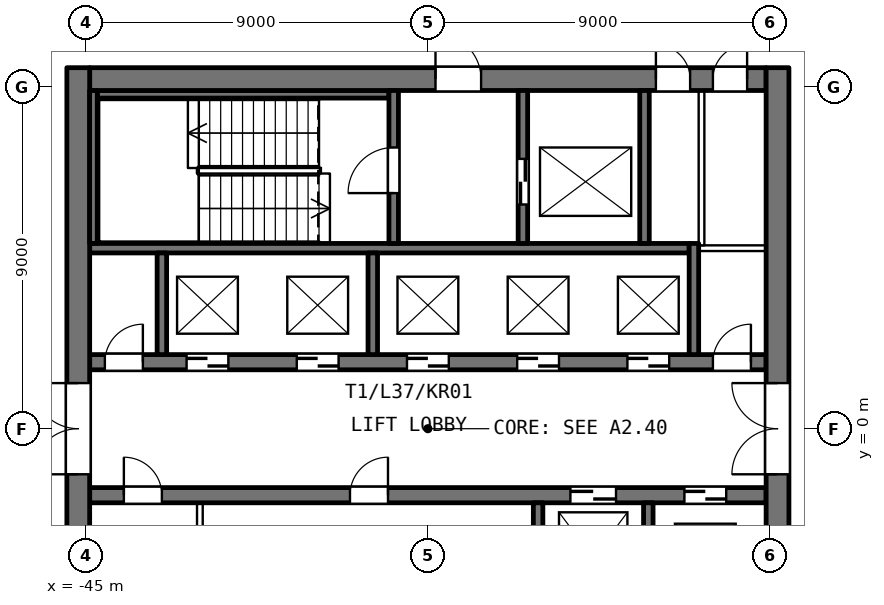
"""IFC4 building model, lengths in metres.
Left out: names, types, materials, properties, quantities, classifications, styles, units other than length and angle.
Written with IfcOpenShell. Run it as: python <this file> out.ifc"""

import sys

from ifc_helpers import new_model, si_unit, direction, frame, frame_2d, origin, place, context, subcontext, project, spatial, rectangle, extrude, element, fill, save


model = new_model("IFC4")
c1 = context("Model", 3, precision=1e-05, world=origin(), true_north=direction((0.0, 1.0)))
c2 = subcontext(c1, "Body", "Model", "MODEL_VIEW")
j1 = project(units=[si_unit("LENGTHUNIT", "METRE"), si_unit("PLANEANGLEUNIT", "RADIAN")], contexts=[c1])
p1 = place(None, origin())
s1 = spatial("IfcSite", under=j1, at=p1, CompositionType="ELEMENT")
p2 = place(p1, origin())
s2 = spatial("IfcBuilding", under=s1, at=p2, CompositionType="ELEMENT")
p3 = place(p2, frame((0.0, 0.0, 156.8)))
s3 = spatial("IfcBuildingStorey", under=s2, at=p3, CompositionType="ELEMENT", Elevation=156.8)
p4 = place(p3, frame((-44.9, -1.75, 0.0), z_axis=(0.0, 0.0, 1.0), x_axis=(1.0, 0.0, 0.0)))
e1 = element("IfcWall", 1, at=p4, inside=s3, PredefinedType="SHEAR", context=c2, shape_type="SweptSolid", body=[
    extrude(rectangle(XDim=17.8, YDim=0.4, at=frame_2d((8.9, 0.0))), origin(), (0.0, 0.0, 1.0), 3.7),
])
p5 = place(p4, frame((12.65, 0.0, 0.0)))
e2 = element("IfcOpeningElement", 2, at=p5, cuts=e1, PredefinedType="OPENING", context=c2, shape_type="SweptSolid", body=[
    extrude(rectangle(XDim=1.2, YDim=2.1, at=frame_2d((0.6, 1.05))), frame((0.0, 0.21, 0.0), z_axis=(0.0, -1.0, 0.0), x_axis=(1.0, 0.0, 0.0)), (0.0, 0.0, 1.0), 0.42),
])
p6 = place(p4, frame((15.65, 0.0, 0.0)))
e3 = element("IfcOpeningElement", 3, at=p6, cuts=e1, PredefinedType="OPENING", context=c2, shape_type="SweptSolid", body=[
    extrude(rectangle(XDim=1.1, YDim=2.1, at=frame_2d((0.55, 1.05))), frame((0.0, 0.21, 0.0), z_axis=(0.0, -1.0, 0.0), x_axis=(1.0, 0.0, 0.0)), (0.0, 0.0, 1.0), 0.42),
])
p7 = place(p4, frame((0.9, 0.0, 0.0)))
e4 = element("IfcOpeningElement", 4, at=p7, cuts=e1, PredefinedType="OPENING", context=c2, shape_type="SweptSolid", body=[
    extrude(rectangle(XDim=1.0, YDim=2.1, at=frame_2d((0.5, 1.05))), frame((0.0, 0.21, 0.0), z_axis=(0.0, -1.0, 0.0), x_axis=(1.0, 0.0, 0.0)), (0.0, 0.0, 1.0), 0.42),
])
p8 = place(p4, frame((6.85, 0.0, 0.0)))
e5 = element("IfcOpeningElement", 5, at=p8, cuts=e1, PredefinedType="OPENING", context=c2, shape_type="SweptSolid", body=[
    extrude(rectangle(XDim=1.0, YDim=2.1, at=frame_2d((0.5, 1.05))), frame((0.0, 0.21, 0.0), z_axis=(0.0, -1.0, 0.0), x_axis=(1.0, 0.0, 0.0)), (0.0, 0.0, 1.0), 0.42),
])
p9 = place(p3, frame((-44.9, 1.75, 0.0), z_axis=(0.0, 0.0, 1.0), x_axis=(1.0, 0.0, 0.0)))
e6 = element("IfcWall", 6, at=p9, inside=s3, PredefinedType="SHEAR", context=c2, shape_type="SweptSolid", body=[
    extrude(rectangle(XDim=17.8, YDim=0.4, at=frame_2d((8.9, 0.0))), origin(), (0.0, 0.0, 1.0), 3.7),
])
p10 = place(p9, frame((0.4, 0.0, 0.0)))
e7 = element("IfcOpeningElement", 7, at=p10, cuts=e6, PredefinedType="OPENING", context=c2, shape_type="SweptSolid", body=[
    extrude(rectangle(XDim=1.0, YDim=2.1, at=frame_2d((0.5, 1.05))), frame((0.0, 0.21, 0.0), z_axis=(0.0, -1.0, 0.0), x_axis=(1.0, 0.0, 0.0)), (0.0, 0.0, 1.0), 0.42),
])
p11 = place(p9, frame((2.55, 0.0, 0.0)))
e8 = element("IfcOpeningElement", 8, at=p11, cuts=e6, PredefinedType="OPENING", context=c2, shape_type="SweptSolid", body=[
    extrude(rectangle(XDim=1.1, YDim=2.1, at=frame_2d((0.55, 1.05))), frame((0.0, 0.21, 0.0), z_axis=(0.0, -1.0, 0.0), x_axis=(1.0, 0.0, 0.0)), (0.0, 0.0, 1.0), 0.42),
])
p12 = place(p9, frame((5.45, 0.0, 0.0)))
e9 = element("IfcOpeningElement", 9, at=p12, cuts=e6, PredefinedType="OPENING", context=c2, shape_type="SweptSolid", body=[
    extrude(rectangle(XDim=1.1, YDim=2.1, at=frame_2d((0.55, 1.05))), frame((0.0, 0.21, 0.0), z_axis=(0.0, -1.0, 0.0), x_axis=(1.0, 0.0, 0.0)), (0.0, 0.0, 1.0), 0.42),
])
p13 = place(p9, frame((8.35, 0.0, 0.0)))
e10 = element("IfcOpeningElement", 10, at=p13, cuts=e6, PredefinedType="OPENING", context=c2, shape_type="SweptSolid", body=[
    extrude(rectangle(XDim=1.1, YDim=2.1, at=frame_2d((0.55, 1.05))), frame((0.0, 0.21, 0.0), z_axis=(0.0, -1.0, 0.0), x_axis=(1.0, 0.0, 0.0)), (0.0, 0.0, 1.0), 0.42),
])
p14 = place(p9, frame((11.25, 0.0, 0.0)))
e11 = element("IfcOpeningElement", 11, at=p14, cuts=e6, PredefinedType="OPENING", context=c2, shape_type="SweptSolid", body=[
    extrude(rectangle(XDim=1.1, YDim=2.1, at=frame_2d((0.55, 1.05))), frame((0.0, 0.21, 0.0), z_axis=(0.0, -1.0, 0.0), x_axis=(1.0, 0.0, 0.0)), (0.0, 0.0, 1.0), 0.42),
])
p15 = place(p9, frame((14.15, 0.0, 0.0)))
e12 = element("IfcOpeningElement", 12, at=p15, cuts=e6, PredefinedType="OPENING", context=c2, shape_type="SweptSolid", body=[
    extrude(rectangle(XDim=1.1, YDim=2.1, at=frame_2d((0.55, 1.05))), frame((0.0, 0.21, 0.0), z_axis=(0.0, -1.0, 0.0), x_axis=(1.0, 0.0, 0.0)), (0.0, 0.0, 1.0), 0.42),
])
p16 = place(p9, frame((16.4, 0.0, 0.0)))
e13 = element("IfcOpeningElement", 13, at=p16, cuts=e6, PredefinedType="OPENING", context=c2, shape_type="SweptSolid", body=[
    extrude(rectangle(XDim=1.0, YDim=2.1, at=frame_2d((0.5, 1.05))), frame((0.0, 0.21, 0.0), z_axis=(0.0, -1.0, 0.0), x_axis=(1.0, 0.0, 0.0)), (0.0, 0.0, 1.0), 0.42),
])
p17 = place(p3, frame((-44.9, 4.75, 0.0), z_axis=(0.0, 0.0, 1.0), x_axis=(1.0, 0.0, 0.0)))
e14 = element("IfcWall", 14, at=p17, inside=s3, PredefinedType="SHEAR", context=c2, shape_type="SweptSolid", body=[
    extrude(rectangle(XDim=15.775, YDim=0.25, at=frame_2d((7.887, 0.0))), origin(), (0.0, 0.0, 1.0), 3.7),
])
p18 = place(p3, frame((-28.875, 4.75, 0.0), z_axis=(0.0, 0.0, 1.0), x_axis=(1.0, 0.0, 0.0)))
e15 = element("IfcWall", 15, at=p18, inside=s3, PredefinedType="PARTITIONING", context=c2, shape_type="SweptSolid", body=[
    extrude(rectangle(XDim=1.775, YDim=0.15, at=frame_2d((0.887, 0.0))), origin(), (0.0, 0.0, 1.0), 3.7),
])
p19 = place(p3, frame((-44.7, 8.8, 0.0), z_axis=(0.0, 0.0, 1.0), x_axis=(1.0, 0.0, 0.0)))
e16 = element("IfcWall", 16, at=p19, inside=s3, PredefinedType="SHEAR", context=c2, shape_type="SweptSolid", body=[
    extrude(rectangle(XDim=7.675, YDim=0.2, at=frame_2d((3.837, 0.0))), origin(), (0.0, 0.0, 1.0), 3.7),
])
p20 = place(p3, frame((-44.9, 9.2, 0.0), z_axis=(0.0, 0.0, 1.0), x_axis=(1.0, 0.0, 0.0)))
e17 = element("IfcWall", 17, at=p20, inside=s3, PredefinedType="SHEAR", context=c2, shape_type="SweptSolid", body=[
    extrude(rectangle(XDim=17.8, YDim=0.6, at=frame_2d((8.9, 0.0))), origin(), (0.0, 0.0, 1.0), 3.7),
])
p21 = place(p20, frame((9.1, 0.0, 0.0)))
e18 = element("IfcOpeningElement", 18, at=p21, cuts=e17, PredefinedType="OPENING", context=c2, shape_type="SweptSolid", body=[
    extrude(rectangle(XDim=1.2, YDim=2.1, at=frame_2d((0.6, 1.05))), frame((0.0, 0.31, 0.0), z_axis=(0.0, -1.0, 0.0), x_axis=(1.0, 0.0, 0.0)), (0.0, 0.0, 1.0), 0.62),
])
p22 = place(p20, frame((14.9, 0.0, 0.0)))
e19 = element("IfcOpeningElement", 19, at=p22, cuts=e17, PredefinedType="OPENING", context=c2, shape_type="SweptSolid", body=[
    extrude(rectangle(XDim=0.9, YDim=2.1, at=frame_2d((0.45, 1.05))), frame((0.0, 0.31, 0.0), z_axis=(0.0, -1.0, 0.0), x_axis=(1.0, 0.0, 0.0)), (0.0, 0.0, 1.0), 0.62),
])
p23 = place(p20, frame((16.4, 0.0, 0.0)))
e20 = element("IfcOpeningElement", 20, at=p23, cuts=e17, PredefinedType="OPENING", context=c2, shape_type="SweptSolid", body=[
    extrude(rectangle(XDim=0.9, YDim=2.1, at=frame_2d((0.45, 1.05))), frame((0.0, 0.31, 0.0), z_axis=(0.0, -1.0, 0.0), x_axis=(1.0, 0.0, 0.0)), (0.0, 0.0, 1.0), 0.62),
])
p24 = place(p3, frame((-45.2, -9.5, 0.0), z_axis=(0.0, 0.0, 1.0), x_axis=(0.0, 1.0, 0.0)))
e21 = element("IfcWall", 21, at=p24, inside=s3, PredefinedType="SHEAR", context=c2, shape_type="SweptSolid", body=[
    extrude(rectangle(XDim=19.0, YDim=0.6, at=frame_2d((9.5, 0.0))), origin(), (0.0, 0.0, 1.0), 3.7),
])
p25 = place(p24, frame((8.3, 0.0, 0.0)))
e22 = element("IfcOpeningElement", 22, at=p25, cuts=e21, PredefinedType="OPENING", context=c2, shape_type="SweptSolid", body=[
    extrude(rectangle(XDim=2.4, YDim=2.1, at=frame_2d((1.2, 1.05))), frame((0.0, 0.31, 0.0), z_axis=(0.0, -1.0, 0.0), x_axis=(1.0, 0.0, 0.0)), (0.0, 0.0, 1.0), 0.62),
])
p26 = place(p3, frame((-44.8, 4.875, 0.0), z_axis=(0.0, 0.0, 1.0), x_axis=(0.0, 1.0, 0.0)))
e23 = element("IfcWall", 23, at=p26, inside=s3, PredefinedType="SHEAR", context=c2, shape_type="SweptSolid", body=[
    extrude(rectangle(XDim=4.025, YDim=0.2, at=frame_2d((2.012, 0.0))), origin(), (0.0, 0.0, 1.0), 3.7),
])
p27 = place(p3, frame((-43.0, 1.95, 0.0), z_axis=(0.0, 0.0, 1.0), x_axis=(0.0, 1.0, 0.0)))
e24 = element("IfcWall", 24, at=p27, inside=s3, PredefinedType="SHEAR", context=c2, shape_type="SweptSolid", body=[
    extrude(rectangle(XDim=2.675, YDim=0.25, at=frame_2d((1.337, 0.0))), origin(), (0.0, 0.0, 1.0), 3.7),
])
p28 = place(p3, frame((-42.0, -4.675, 0.0), z_axis=(0.0, 0.0, 1.0), x_axis=(0.0, 1.0, 0.0)))
e25 = element("IfcWall", 25, at=p28, inside=s3, PredefinedType="PARTITIONING", context=c2, shape_type="SweptSolid", body=[
    extrude(rectangle(XDim=2.725, YDim=0.15, at=frame_2d((1.363, 0.0))), origin(), (0.0, 0.0, 1.0), 3.7),
])
p29 = place(p3, frame((-37.45, 1.95, 0.0), z_axis=(0.0, 0.0, 1.0), x_axis=(0.0, 1.0, 0.0)))
e26 = element("IfcWall", 26, at=p29, inside=s3, PredefinedType="SHEAR", context=c2, shape_type="SweptSolid", body=[
    extrude(rectangle(XDim=2.675, YDim=0.25, at=frame_2d((1.337, 0.0))), origin(), (0.0, 0.0, 1.0), 3.7),
])
p30 = place(p3, frame((-36.9, 4.875, 0.0), z_axis=(0.0, 0.0, 1.0), x_axis=(0.0, 1.0, 0.0)))
e27 = element("IfcWall", 27, at=p30, inside=s3, PredefinedType="SHEAR", context=c2, shape_type="SweptSolid", body=[
    extrude(rectangle(XDim=4.025, YDim=0.25, at=frame_2d((2.012, 0.0))), origin(), (0.0, 0.0, 1.0), 3.7),
])
p31 = place(p30, frame((1.325, 0.0, 0.0)))
e28 = element("IfcOpeningElement", 28, at=p31, cuts=e27, PredefinedType="OPENING", context=c2, shape_type="SweptSolid", body=[
    extrude(rectangle(XDim=1.2, YDim=2.1, at=frame_2d((0.6, 1.05))), frame((0.0, 0.135, 0.0), z_axis=(0.0, -1.0, 0.0), x_axis=(1.0, 0.0, 0.0)), (0.0, 0.0, 1.0), 0.27),
])
p32 = place(p3, frame((-33.5, 4.875, 0.0), z_axis=(0.0, 0.0, 1.0), x_axis=(0.0, 1.0, 0.0)))
e29 = element("IfcWall", 29, at=p32, inside=s3, PredefinedType="SHEAR", context=c2, shape_type="SweptSolid", body=[
    extrude(rectangle(XDim=4.025, YDim=0.25, at=frame_2d((2.012, 0.0))), origin(), (0.0, 0.0, 1.0), 3.7),
])
p33 = place(p32, frame((1.025, 0.0, 0.0)))
e30 = element("IfcOpeningElement", 30, at=p33, cuts=e29, PredefinedType="OPENING", context=c2, shape_type="SweptSolid", body=[
    extrude(rectangle(XDim=1.2, YDim=2.1, at=frame_2d((0.6, 1.05))), frame((0.0, 0.135, 0.0), z_axis=(0.0, -1.0, 0.0), x_axis=(1.0, 0.0, 0.0)), (0.0, 0.0, 1.0), 0.27),
])
p34 = place(p3, frame((-33.1, -4.625, 0.0), z_axis=(0.0, 0.0, 1.0), x_axis=(0.0, 1.0, 0.0)))
e31 = element("IfcWall", 31, at=p34, inside=s3, PredefinedType="SHEAR", context=c2, shape_type="SweptSolid", body=[
    extrude(rectangle(XDim=2.675, YDim=0.25, at=frame_2d((1.337, 0.0))), origin(), (0.0, 0.0, 1.0), 3.7),
])
p35 = place(p3, frame((-30.3, 4.875, 0.0), z_axis=(0.0, 0.0, 1.0), x_axis=(0.0, 1.0, 0.0)))
e32 = element("IfcWall", 32, at=p35, inside=s3, PredefinedType="SHEAR", context=c2, shape_type="SweptSolid", body=[
    extrude(rectangle(XDim=4.025, YDim=0.25, at=frame_2d((2.012, 0.0))), origin(), (0.0, 0.0, 1.0), 3.7),
])
p36 = place(p3, frame((-30.2, -4.625, 0.0), z_axis=(0.0, 0.0, 1.0), x_axis=(0.0, 1.0, 0.0)))
e33 = element("IfcWall", 33, at=p36, inside=s3, PredefinedType="SHEAR", context=c2, shape_type="SweptSolid", body=[
    extrude(rectangle(XDim=2.675, YDim=0.25, at=frame_2d((1.337, 0.0))), origin(), (0.0, 0.0, 1.0), 3.7),
])
p37 = place(p3, frame((-29.0, 1.95, 0.0), z_axis=(0.0, 0.0, 1.0), x_axis=(0.0, 1.0, 0.0)))
e34 = element("IfcWall", 34, at=p37, inside=s3, PredefinedType="SHEAR", context=c2, shape_type="SweptSolid", body=[
    extrude(rectangle(XDim=2.925, YDim=0.25, at=frame_2d((1.462, 0.0))), origin(), (0.0, 0.0, 1.0), 3.7),
])
p38 = place(p3, frame((-28.8, 4.825, 0.0), z_axis=(0.0, 0.0, 1.0), x_axis=(0.0, 1.0, 0.0)))
e35 = element("IfcWall", 35, at=p38, inside=s3, PredefinedType="PARTITIONING", context=c2, shape_type="SweptSolid", body=[
    extrude(rectangle(XDim=4.075, YDim=0.15, at=frame_2d((2.038, 0.0))), origin(), (0.0, 0.0, 1.0), 3.7),
])
p39 = place(p3, frame((-26.8, -9.5, 0.0), z_axis=(0.0, 0.0, 1.0), x_axis=(0.0, 1.0, 0.0)))
e36 = element("IfcWall", 36, at=p39, inside=s3, PredefinedType="SHEAR", context=c2, shape_type="SweptSolid", body=[
    extrude(rectangle(XDim=19.0, YDim=0.6, at=frame_2d((9.5, 0.0))), origin(), (0.0, 0.0, 1.0), 3.7),
])
p40 = place(p39, frame((8.3, 0.0, 0.0)))
e37 = element("IfcOpeningElement", 37, at=p40, cuts=e36, PredefinedType="OPENING", context=c2, shape_type="SweptSolid", body=[
    extrude(rectangle(XDim=2.4, YDim=2.1, at=frame_2d((1.2, 1.05))), frame((0.0, 0.31, 0.0), z_axis=(0.0, -1.0, 0.0), x_axis=(1.0, 0.0, 0.0)), (0.0, 0.0, 1.0), 0.62),
])
p41 = place(p25, origin())
e38 = element("IfcDoor", 38, at=p41, inside=s3, OperationType="DOUBLE_DOOR_SINGLE_SWING", PredefinedType="DOOR", context=c2, shape_type="SweptSolid", body=[
    extrude(rectangle(XDim=2.4, YDim=2.1, at=frame_2d((1.2, 1.05))), frame((0.0, -0.125, 0.0), z_axis=(0.0, -1.0, 0.0), x_axis=(1.0, 0.0, 0.0)), (0.0, 0.0, 1.0), 0.05),
])
fill(e22, e38)
p42 = place(p40, origin())
e39 = element("IfcDoor", 39, at=p42, inside=s3, OperationType="DOUBLE_DOOR_SINGLE_SWING", PredefinedType="DOOR", context=c2, shape_type="SweptSolid", body=[
    extrude(rectangle(XDim=2.4, YDim=2.1, at=frame_2d((1.2, 1.05))), frame((0.0, 0.175, 0.0), z_axis=(0.0, -1.0, 0.0), x_axis=(1.0, 0.0, 0.0)), (0.0, 0.0, 1.0), 0.05),
])
fill(e37, e39)
p43 = place(p10, origin())
e40 = element("IfcDoor", 40, at=p43, inside=s3, OperationType="SINGLE_SWING_RIGHT", PredefinedType="DOOR", context=c2, shape_type="SweptSolid", body=[
    extrude(rectangle(XDim=1.0, YDim=2.1, at=frame_2d((0.5, 1.05))), frame((0.0, 0.025, 0.0), z_axis=(0.0, -1.0, 0.0), x_axis=(1.0, 0.0, 0.0)), (0.0, 0.0, 1.0), 0.05),
])
fill(e7, e40)
p44 = place(p11, origin())
e41 = element("IfcDoor", 41, at=p44, inside=s3, OperationType="SLIDING_TO_LEFT", PredefinedType="DOOR", context=c2, shape_type="SweptSolid", body=[
    extrude(rectangle(XDim=1.1, YDim=2.1, at=frame_2d((0.55, 1.05))), frame((0.0, 0.025, 0.0), z_axis=(0.0, -1.0, 0.0), x_axis=(1.0, 0.0, 0.0)), (0.0, 0.0, 1.0), 0.05),
])
fill(e8, e41)
p45 = place(p12, origin())
e42 = element("IfcDoor", 42, at=p45, inside=s3, OperationType="SLIDING_TO_LEFT", PredefinedType="DOOR", context=c2, shape_type="SweptSolid", body=[
    extrude(rectangle(XDim=1.1, YDim=2.1, at=frame_2d((0.55, 1.05))), frame((0.0, 0.025, 0.0), z_axis=(0.0, -1.0, 0.0), x_axis=(1.0, 0.0, 0.0)), (0.0, 0.0, 1.0), 0.05),
])
fill(e9, e42)
p46 = place(p13, origin())
e43 = element("IfcDoor", 43, at=p46, inside=s3, OperationType="SLIDING_TO_LEFT", PredefinedType="DOOR", context=c2, shape_type="SweptSolid", body=[
    extrude(rectangle(XDim=1.1, YDim=2.1, at=frame_2d((0.55, 1.05))), frame((0.0, 0.025, 0.0), z_axis=(0.0, -1.0, 0.0), x_axis=(1.0, 0.0, 0.0)), (0.0, 0.0, 1.0), 0.05),
])
fill(e10, e43)
p47 = place(p14, origin())
e44 = element("IfcDoor", 44, at=p47, inside=s3, OperationType="SLIDING_TO_LEFT", PredefinedType="DOOR", context=c2, shape_type="SweptSolid", body=[
    extrude(rectangle(XDim=1.1, YDim=2.1, at=frame_2d((0.55, 1.05))), frame((0.0, 0.025, 0.0), z_axis=(0.0, -1.0, 0.0), x_axis=(1.0, 0.0, 0.0)), (0.0, 0.0, 1.0), 0.05),
])
fill(e11, e44)
p48 = place(p15, origin())
e45 = element("IfcDoor", 45, at=p48, inside=s3, OperationType="SLIDING_TO_LEFT", PredefinedType="DOOR", context=c2, shape_type="SweptSolid", body=[
    extrude(rectangle(XDim=1.1, YDim=2.1, at=frame_2d((0.55, 1.05))), frame((0.0, 0.025, 0.0), z_axis=(0.0, -1.0, 0.0), x_axis=(1.0, 0.0, 0.0)), (0.0, 0.0, 1.0), 0.05),
])
fill(e12, e45)
p49 = place(p16, origin())
e46 = element("IfcDoor", 46, at=p49, inside=s3, OperationType="SINGLE_SWING_RIGHT", PredefinedType="DOOR", context=c2, shape_type="SweptSolid", body=[
    extrude(rectangle(XDim=1.0, YDim=2.1, at=frame_2d((0.5, 1.05))), frame((0.0, 0.025, 0.0), z_axis=(0.0, -1.0, 0.0), x_axis=(1.0, 0.0, 0.0)), (0.0, 0.0, 1.0), 0.05),
])
fill(e13, e46)
p50 = place(p5, origin())
e47 = element("IfcDoor", 47, at=p50, inside=s3, OperationType="SLIDING_TO_LEFT", PredefinedType="DOOR", context=c2, shape_type="SweptSolid", body=[
    extrude(rectangle(XDim=1.2, YDim=2.1, at=frame_2d((0.6, 1.05))), frame((0.0, 0.025, 0.0), z_axis=(0.0, -1.0, 0.0), x_axis=(1.0, 0.0, 0.0)), (0.0, 0.0, 1.0), 0.05),
])
fill(e2, e47)
p51 = place(p6, origin())
e48 = element("IfcDoor", 48, at=p51, inside=s3, OperationType="SLIDING_TO_LEFT", PredefinedType="DOOR", context=c2, shape_type="SweptSolid", body=[
    extrude(rectangle(XDim=1.1, YDim=2.1, at=frame_2d((0.55, 1.05))), frame((0.0, 0.025, 0.0), z_axis=(0.0, -1.0, 0.0), x_axis=(1.0, 0.0, 0.0)), (0.0, 0.0, 1.0), 0.05),
])
fill(e3, e48)
p52 = place(p33, origin())
e49 = element("IfcDoor", 49, at=p52, inside=s3, OperationType="SLIDING_TO_LEFT", PredefinedType="DOOR", context=c2, shape_type="SweptSolid", body=[
    extrude(rectangle(XDim=1.2, YDim=2.1, at=frame_2d((0.6, 1.05))), frame((0.0, 0.025, 0.0), z_axis=(0.0, -1.0, 0.0), x_axis=(1.0, 0.0, 0.0)), (0.0, 0.0, 1.0), 0.05),
])
fill(e30, e49)
p53 = place(p7, origin())
e50 = element("IfcDoor", 50, at=p53, inside=s3, OperationType="SINGLE_SWING_LEFT", PredefinedType="DOOR", context=c2, shape_type="SweptSolid", body=[
    extrude(rectangle(XDim=1.0, YDim=2.1, at=frame_2d((0.5, 1.05))), frame((0.0, 0.025, 0.0), z_axis=(0.0, -1.0, 0.0), x_axis=(1.0, 0.0, 0.0)), (0.0, 0.0, 1.0), 0.05),
])
fill(e4, e50)
p54 = place(p8, origin())
e51 = element("IfcDoor", 51, at=p54, inside=s3, OperationType="SINGLE_SWING_RIGHT", PredefinedType="DOOR", context=c2, shape_type="SweptSolid", body=[
    extrude(rectangle(XDim=1.0, YDim=2.1, at=frame_2d((0.5, 1.05))), frame((0.0, 0.025, 0.0), z_axis=(0.0, -1.0, 0.0), x_axis=(1.0, 0.0, 0.0)), (0.0, 0.0, 1.0), 0.05),
])
fill(e5, e51)
p55 = place(p31, origin())
e52 = element("IfcDoor", 52, at=p55, inside=s3, OperationType="SINGLE_SWING_LEFT", PredefinedType="DOOR", context=c2, shape_type="SweptSolid", body=[
    extrude(rectangle(XDim=1.2, YDim=2.1, at=frame_2d((0.6, 1.05))), frame((0.0, 0.025, 0.0), z_axis=(0.0, -1.0, 0.0), x_axis=(1.0, 0.0, 0.0)), (0.0, 0.0, 1.0), 0.05),
])
fill(e28, e52)
p56 = place(p21, origin())
e53 = element("IfcDoor", 53, at=p56, inside=s3, OperationType="SINGLE_SWING_LEFT", PredefinedType="DOOR", context=c2, shape_type="SweptSolid", body=[
    extrude(rectangle(XDim=1.2, YDim=2.1, at=frame_2d((0.6, 1.05))), frame((0.0, -0.125, 0.0), z_axis=(0.0, -1.0, 0.0), x_axis=(1.0, 0.0, 0.0)), (0.0, 0.0, 1.0), 0.05),
])
fill(e18, e53)
p57 = place(p22, origin())
e54 = element("IfcDoor", 54, at=p57, inside=s3, OperationType="SINGLE_SWING_LEFT", PredefinedType="DOOR", context=c2, shape_type="SweptSolid", body=[
    extrude(rectangle(XDim=0.9, YDim=2.1, at=frame_2d((0.45, 1.05))), frame((0.0, -0.125, 0.0), z_axis=(0.0, -1.0, 0.0), x_axis=(1.0, 0.0, 0.0)), (0.0, 0.0, 1.0), 0.05),
])
fill(e19, e54)
p58 = place(p23, origin())
e55 = element("IfcDoor", 55, at=p58, inside=s3, OperationType="SINGLE_SWING_RIGHT", PredefinedType="DOOR", context=c2, shape_type="SweptSolid", body=[
    extrude(rectangle(XDim=0.9, YDim=2.1, at=frame_2d((0.45, 1.05))), frame((0.0, -0.125, 0.0), z_axis=(0.0, -1.0, 0.0), x_axis=(1.0, 0.0, 0.0)), (0.0, 0.0, 1.0), 0.05),
])
fill(e20, e55)
save(model, sys.argv[1])
